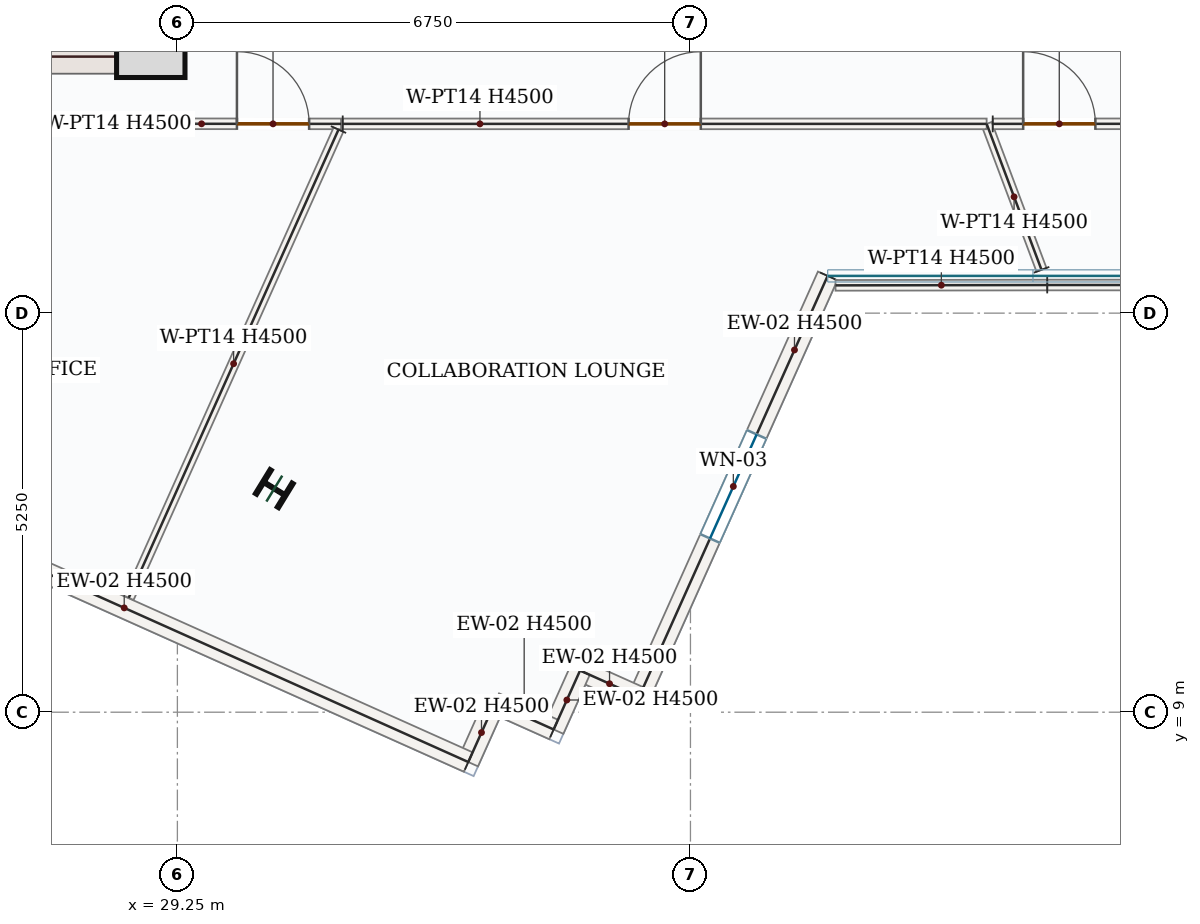
"""IFC4 building model, lengths in metres.
Left out: names, types, materials, properties, quantities, classifications, styles, units other than length and angle.
Written with IfcOpenShell. Run it as: python <this file> out.ifc"""

import sys

from ifc_helpers import new_model, si_unit, direction, frame, frame_2d, origin, origin_2d, place, context, subcontext, project, spatial, rectangle, i_section, extrude, source, transform, mapped, element, fill, save


model = new_model("IFC4")
c1 = context("Model", 3, precision=1e-05, world=origin(), true_north=direction((0.0, 1.0)))
c2 = subcontext(c1, "Body", "Model", "MODEL_VIEW")
j1 = project(units=[si_unit("LENGTHUNIT", "METRE"), si_unit("PLANEANGLEUNIT", "RADIAN")], contexts=[c1])
p1 = place(None, origin())
s1 = spatial("IfcSite", under=j1, at=p1, CompositionType="ELEMENT")
p2 = place(p1, origin())
s2 = spatial("IfcBuilding", under=s1, at=p2, CompositionType="ELEMENT")
p3 = place(p2, frame((0.0, 0.0, 361.05)))
s3 = spatial("IfcBuildingStorey", under=s2, at=p3, CompositionType="ELEMENT", Elevation=361.05)
p4 = place(p3, frame((29.025, 17.4, 0.0), z_axis=(0.0, 0.0, 1.0), x_axis=(0.0, 1.0, 0.0)))
e1 = element("IfcWall", 1, at=p4, inside=s3, PredefinedType="SHEAR", context=c2, shape_type="SweptSolid", body=[
    extrude(rectangle(XDim=8.55, YDim=0.45, at=frame_2d((4.275, 0.0))), origin(), (0.0, 0.0, 1.0), 4.5),
])
p5 = place(p4, frame((6.65, 0.0, 0.0)))
e2 = element("IfcOpeningElement", 2, at=p5, cuts=e1, PredefinedType="OPENING", context=c2, shape_type="SweptSolid", body=[
    extrude(rectangle(XDim=1.1, YDim=2.2, at=frame_2d((0.55, 1.1))), frame((0.0, 0.235, 0.0), z_axis=(0.0, -1.0, 0.0), x_axis=(1.0, 0.0, 0.0)), (0.0, 0.0, 1.0), 0.47),
])
p6 = place(p4, frame((2.15, 0.0, 0.0)))
e3 = element("IfcOpeningElement", 3, at=p6, cuts=e1, PredefinedType="OPENING", context=c2, shape_type="SweptSolid", body=[
    extrude(rectangle(XDim=0.88, YDim=2.1, at=frame_2d((0.44, 1.05))), frame((0.0, 0.235, 0.0), z_axis=(0.0, -1.0, 0.0), x_axis=(1.0, 0.0, 0.0)), (0.0, 0.0, 1.0), 0.47),
])
p7 = place(p4, frame((4.25, 0.0, 0.0)))
e4 = element("IfcOpeningElement", 4, at=p7, cuts=e1, PredefinedType="OPENING", context=c2, shape_type="SweptSolid", body=[
    extrude(rectangle(XDim=0.88, YDim=2.1, at=frame_2d((0.44, 1.05))), frame((0.0, 0.235, 0.0), z_axis=(0.0, -1.0, 0.0), x_axis=(1.0, 0.0, 0.0)), (0.0, 0.0, 1.0), 0.47),
])
m1 = source(origin(), c2, "Body", "SweptSolid", [
    extrude(rectangle(XDim=7.1, YDim=0.45, at=frame_2d((3.55, 0.0))), origin(), (0.0, 0.0, 1.0), 4.5),
])
p8 = place(p3, frame((21.7, 17.625, 0.0), z_axis=(0.0, 0.0, 1.0), x_axis=(1.0, 0.0, 0.0)))
e5 = element("IfcWall", 5, at=p8, inside=s3, PredefinedType="SHEAR", context=c2, shape_type="MappedRepresentation", body=[
    mapped(m1, transform((0.0, 0.0, 0.0), x_axis=(1.0, 0.0, 0.0), y_axis=(0.0, 1.0, 0.0), z_axis=(0.0, 0.0, 1.0), scale=1.0)),
])
m2 = source(origin(), c2, "Body", "SweptSolid", [
    extrude(rectangle(XDim=0.9, YDim=0.9, at=origin_2d()), origin(), (0.0, 0.0, 1.0), 4.8),
])
p9 = place(p3, frame((28.9, 17.8, 0.0), z_axis=(0.0, 0.0, 1.0), x_axis=(1.0, 0.0, 0.0)))
e6 = element("IfcColumn", 6, at=p9, inside=s3, PredefinedType="COLUMN", context=c2, shape_type="MappedRepresentation", body=[
    mapped(m2, transform((0.0, 0.0, 0.0), x_axis=(1.0, 0.0, 0.0), y_axis=(0.0, 1.0, 0.0), z_axis=(0.0, 0.0, 1.0), scale=1.0)),
])
m3 = source(origin(), c2, "Body", "SweptSolid", [
    extrude(i_section(OverallWidth=0.369, OverallDepth=0.356, WebThickness=0.011, FlangeThickness=0.018, FilletRadius=0.018, at=origin_2d()), origin(), (0.0, 0.0, 1.0), 4.8),
])
p10 = place(p3, frame((30.525, 11.942, 0.0), z_axis=(0.0, 0.0, 1.0), x_axis=(0.522498564716, 0.852640164354, 0.0)))
e7 = element("IfcColumn", 7, at=p10, inside=s3, PredefinedType="COLUMN", context=c2, shape_type="MappedRepresentation", body=[
    mapped(m3, transform((0.0, 0.0, 0.0), x_axis=(1.0, 0.0, 0.0), y_axis=(0.0, 1.0, 0.0), z_axis=(0.0, 0.0, 1.0), scale=1.0)),
])
p11 = place(p3, frame((37.805, 14.74, 0.0), z_axis=(0.0, 0.0, 1.0), x_axis=(-0.408872261421, -0.912591624901, 0.0)))
e8 = element("IfcWall", 8, at=p11, inside=s3, PredefinedType="SOLIDWALL", context=c2, shape_type="SweptSolid", body=[
    extrude(rectangle(XDim=6.07, YDim=0.28, at=frame_2d((3.035, 0.0))), origin(), (0.0, 0.0, 1.0), 4.5),
])
p12 = place(p11, frame((2.285, 0.0, 0.85)))
e9 = element("IfcOpeningElement", 9, at=p12, cuts=e8, PredefinedType="OPENING", context=c2, shape_type="SweptSolid", body=[
    extrude(rectangle(XDim=1.5, YDim=1.5, at=frame_2d((0.75, 0.75))), frame((0.0, 0.15, 0.0), z_axis=(0.0, -1.0, 0.0), x_axis=(1.0, 0.0, 0.0)), (0.0, 0.0, 1.0), 0.3),
])
m4 = source(origin(), c2, "Body", "SweptSolid", [
    extrude(rectangle(XDim=0.85, YDim=0.28, at=frame_2d((0.425, 0.0))), origin(), (0.0, 0.0, 1.0), 4.5),
])
p13 = place(p3, frame((35.323, 9.201, 0.0), z_axis=(0.0, 0.0, 1.0), x_axis=(-0.912634994598, 0.408775447691, 0.0)))
e10 = element("IfcWall", 10, at=p13, inside=s3, PredefinedType="SOLIDWALL", context=c2, shape_type="MappedRepresentation", body=[
    mapped(m4, transform((0.0, 0.0, 0.0), x_axis=(1.0, 0.0, 0.0), y_axis=(0.0, 1.0, 0.0), z_axis=(0.0, 0.0, 1.0), scale=1.0)),
])
m5 = source(origin(), c2, "Body", "SweptSolid", [
    extrude(rectangle(XDim=0.85, YDim=0.28, at=frame_2d((0.425, 0.0))), origin(), (0.0, 0.0, 1.0), 4.5),
])
p14 = place(p3, frame((34.548, 9.548, 0.0), z_axis=(0.0, 0.0, 1.0), x_axis=(-0.409014667771, -0.912527808644, 0.0)))
e11 = element("IfcWall", 11, at=p14, inside=s3, PredefinedType="SOLIDWALL", context=c2, shape_type="MappedRepresentation", body=[
    mapped(m5, transform((0.0, 0.0, 0.0), x_axis=(1.0, 0.0, 0.0), y_axis=(0.0, 1.0, 0.0), z_axis=(0.0, 0.0, 1.0), scale=1.0)),
])
for number, where, z_axis, x_axis in (
    (12, (34.2, 8.773, 0.0), (0.0, 0.0, 1.0), (-0.913, 0.409, 0.0)),
    (13, (33.425, 9.12, 0.0), (0.0, 0.0, 1.0), (-0.409, -0.913, 0.0)),
):
    element("IfcWall", number, at=place(p3, frame(where, z_axis=z_axis, x_axis=x_axis)), inside=s3, PredefinedType="SOLIDWALL", context=c2, shape_type="MappedRepresentation", body=[
        mapped(m4, transform((0.0, 0.0, 0.0), x_axis=(1.0, 0.0, 0.0), y_axis=(0.0, 1.0, 0.0), z_axis=(0.0, 0.0, 1.0), scale=1.0)),
    ])
m6 = source(origin(), c2, "Body", "SweptSolid", [
    extrude(rectangle(XDim=9.92, YDim=0.28, at=frame_2d((4.96, 0.0))), origin(), (0.0, 0.0, 1.0), 4.5),
])
p15 = place(p3, frame((33.077, 8.344, 0.0), z_axis=(0.0, 0.0, 1.0), x_axis=(-0.91259673328, 0.408860859469, 0.0)))
e14 = element("IfcWall", 14, at=p15, inside=s3, PredefinedType="SOLIDWALL", context=c2, shape_type="MappedRepresentation", body=[
    mapped(m6, transform((0.0, 0.0, 0.0), x_axis=(1.0, 0.0, 0.0), y_axis=(0.0, 1.0, 0.0), z_axis=(0.0, 0.0, 1.0), scale=1.0)),
])
m7 = source(origin(), c2, "Body", "SweptSolid", [
    extrude(rectangle(XDim=2.051, YDim=0.14, at=frame_2d((1.025, 0.0))), origin(), (0.0, 0.0, 1.0), 4.5),
])
p16 = place(p3, frame((40.618, 14.82, 0.0), z_axis=(0.0, 0.0, 1.0), x_axis=(-0.35174952174, 0.936094158702, 0.0)))
e15 = element("IfcWall", 15, at=p16, inside=s3, PredefinedType="PARTITIONING", context=c2, shape_type="MappedRepresentation", body=[
    mapped(m7, transform((0.0, 0.0, 0.0), x_axis=(1.0, 0.0, 0.0), y_axis=(0.0, 1.0, 0.0), z_axis=(0.0, 0.0, 1.0), scale=1.0)),
])
p17 = place(p3, frame((39.977, 16.74, 0.0), z_axis=(0.0, 0.0, 1.0), x_axis=(0.999999902865, 0.000440761593, 0.0)))
e16 = element("IfcWall", 16, at=p17, inside=s3, PredefinedType="PARTITIONING", context=c2, shape_type="SweptSolid", body=[
    extrude(rectangle(XDim=2.77, YDim=0.14, at=frame_2d((1.385, 0.0))), origin(), (0.0, 0.0, 1.0), 4.5),
])
p18 = place(p17, frame((0.4, 0.0, 0.0)))
e17 = element("IfcOpeningElement", 17, at=p18, cuts=e16, PredefinedType="OPENING", context=c2, shape_type="SweptSolid", body=[
    extrude(rectangle(XDim=0.95, YDim=2.15, at=frame_2d((0.475, 1.075))), frame((0.0, 0.08, 0.0), z_axis=(0.0, -1.0, 0.0), x_axis=(1.0, 0.0, 0.0)), (0.0, 0.0, 1.0), 0.16),
])
m8 = source(origin(), c2, "Body", "SweptSolid", [
    extrude(rectangle(XDim=6.234, YDim=0.14, at=frame_2d((3.117, 0.0))), origin(), (0.0, 0.0, 1.0), 4.5),
])
p19 = place(p3, frame((46.927, 14.62, 0.0), z_axis=(0.0, 0.0, 1.0), x_axis=(-0.999999996932, 7.8330004e-05, 0.0)))
e18 = element("IfcWall", 18, at=p19, inside=s3, PredefinedType="PARTITIONING", context=c2, shape_type="MappedRepresentation", body=[
    mapped(m8, transform((0.0, 0.0, 0.0), x_axis=(1.0, 0.0, 0.0), y_axis=(0.0, 1.0, 0.0), z_axis=(0.0, 0.0, 1.0), scale=1.0)),
])
p20 = place(p3, frame((29.253, 16.741, 0.0), z_axis=(0.0, 0.0, 1.0), x_axis=(0.999999838805, -0.000567794594, 0.0)))
e19 = element("IfcWall", 19, at=p20, inside=s3, PredefinedType="PARTITIONING", context=c2, shape_type="SweptSolid", body=[
    extrude(rectangle(XDim=2.15, YDim=0.14, at=frame_2d((1.075, 0.0))), origin(), (0.0, 0.0, 1.0), 4.5),
])
p21 = place(p20, frame((0.78, 0.0, 0.0)))
e20 = element("IfcOpeningElement", 20, at=p21, cuts=e19, PredefinedType="OPENING", context=c2, shape_type="SweptSolid", body=[
    extrude(rectangle(XDim=0.95, YDim=2.15, at=frame_2d((0.475, 1.075))), frame((0.0, 0.08, 0.0), z_axis=(0.0, -1.0, 0.0), x_axis=(1.0, 0.0, 0.0)), (0.0, 0.0, 1.0), 0.16),
])
m9 = source(origin(), c2, "Body", "SweptSolid", [
    extrude(rectangle(XDim=6.75, YDim=0.14, at=frame_2d((3.375, 0.0))), origin(), (0.0, 0.0, 1.0), 4.5),
])
p22 = place(p3, frame((31.37, 16.665, 0.0), z_axis=(0.0, 0.0, 1.0), x_axis=(-0.408861688893, -0.912596361682, 0.0)))
e21 = element("IfcWall", 21, at=p22, inside=s3, PredefinedType="PARTITIONING", context=c2, shape_type="MappedRepresentation", body=[
    mapped(m9, transform((0.0, 0.0, 0.0), x_axis=(1.0, 0.0, 0.0), y_axis=(0.0, 1.0, 0.0), z_axis=(0.0, 0.0, 1.0), scale=1.0)),
])
p23 = place(p3, frame((31.425, 16.74, 0.0), z_axis=(0.0, 0.0, 1.0), x_axis=(1.0, 0.0, 0.0)))
e22 = element("IfcWall", 22, at=p23, inside=s3, PredefinedType="PARTITIONING", context=c2, shape_type="SweptSolid", body=[
    extrude(rectangle(XDim=8.472, YDim=0.14, at=frame_2d((4.236, 0.0))), origin(), (0.0, 0.0, 1.0), 4.5),
])
p24 = place(p23, frame((3.761, 0.0, 0.0)))
e23 = element("IfcOpeningElement", 23, at=p24, cuts=e22, PredefinedType="OPENING", context=c2, shape_type="SweptSolid", body=[
    extrude(rectangle(XDim=0.95, YDim=2.15, at=frame_2d((0.475, 1.075))), frame((0.0, 0.08, 0.0), z_axis=(0.0, -1.0, 0.0), x_axis=(1.0, 0.0, 0.0)), (0.0, 0.0, 1.0), 0.16),
])
m10 = source(origin(), c2, "Body", "SweptSolid", [
    extrude(rectangle(XDim=2.785, YDim=0.14, at=frame_2d((1.393, 0.0))), origin(), (0.0, 0.0, 1.0), 4.5),
])
p25 = place(p3, frame((40.694, 14.62, 0.0), z_axis=(0.0, 0.0, 1.0), x_axis=(-0.999998755431, -0.001577699851, 0.0)))
e24 = element("IfcWall", 24, at=p25, inside=s3, PredefinedType="PARTITIONING", context=c2, shape_type="MappedRepresentation", body=[
    mapped(m10, transform((0.0, 0.0, 0.0), x_axis=(1.0, 0.0, 0.0), y_axis=(0.0, 1.0, 0.0), z_axis=(0.0, 0.0, 1.0), scale=1.0)),
])
m11 = source(origin(), c2, "Body", "SweptSolid", [
    extrude(rectangle(XDim=1.5, YDim=1.5, at=frame_2d((0.75, 0.75))), frame((0.0, 0.03, 0.0), z_axis=(0.0, -1.0, 0.0), x_axis=(1.0, 0.0, 0.0)), (0.0, 0.0, 1.0), 0.06),
])
p26 = place(p12, origin())
e25 = element("IfcWindow", 25, at=p26, inside=s3, PartitioningType="SINGLE_PANEL", PredefinedType="WINDOW", context=c2, shape_type="MappedRepresentation", body=[
    mapped(m11, transform((0.0, 0.0, 0.0), x_axis=(1.0, 0.0, 0.0), y_axis=(0.0, 1.0, 0.0), z_axis=(0.0, 0.0, 1.0), scale=1.0)),
])
fill(e9, e25)
m12 = source(origin(), c2, "Body", "SweptSolid", [
    extrude(rectangle(XDim=0.95, YDim=2.15, at=frame_2d((0.475, 1.075))), frame((0.0, 0.025, 0.0), z_axis=(0.0, -1.0, 0.0), x_axis=(1.0, 0.0, 0.0)), (0.0, 0.0, 1.0), 0.05),
])
p27 = place(p21, origin())
e26 = element("IfcDoor", 26, at=p27, inside=s3, OperationType="SINGLE_SWING_LEFT", PredefinedType="DOOR", context=c2, shape_type="MappedRepresentation", body=[
    mapped(m12, transform((0.0, 0.0, 0.0), x_axis=(1.0, 0.0, 0.0), y_axis=(0.0, 1.0, 0.0), z_axis=(0.0, 0.0, 1.0), scale=1.0)),
])
fill(e20, e26)
p28 = place(p24, origin())
e27 = element("IfcDoor", 27, at=p28, inside=s3, OperationType="SINGLE_SWING_RIGHT", PredefinedType="DOOR", context=c2, shape_type="MappedRepresentation", body=[
    mapped(m12, transform((0.0, 0.0, 0.0), x_axis=(1.0, 0.0, 0.0), y_axis=(0.0, 1.0, 0.0), z_axis=(0.0, 0.0, 1.0), scale=1.0)),
])
fill(e23, e27)
p29 = place(p18, origin())
e28 = element("IfcDoor", 28, at=p29, inside=s3, OperationType="SINGLE_SWING_LEFT", PredefinedType="DOOR", context=c2, shape_type="MappedRepresentation", body=[
    mapped(m12, transform((0.0, 0.0, 0.0), x_axis=(1.0, 0.0, 0.0), y_axis=(0.0, 1.0, 0.0), z_axis=(0.0, 0.0, 1.0), scale=1.0)),
])
fill(e17, e28)
save(model, sys.argv[1])
